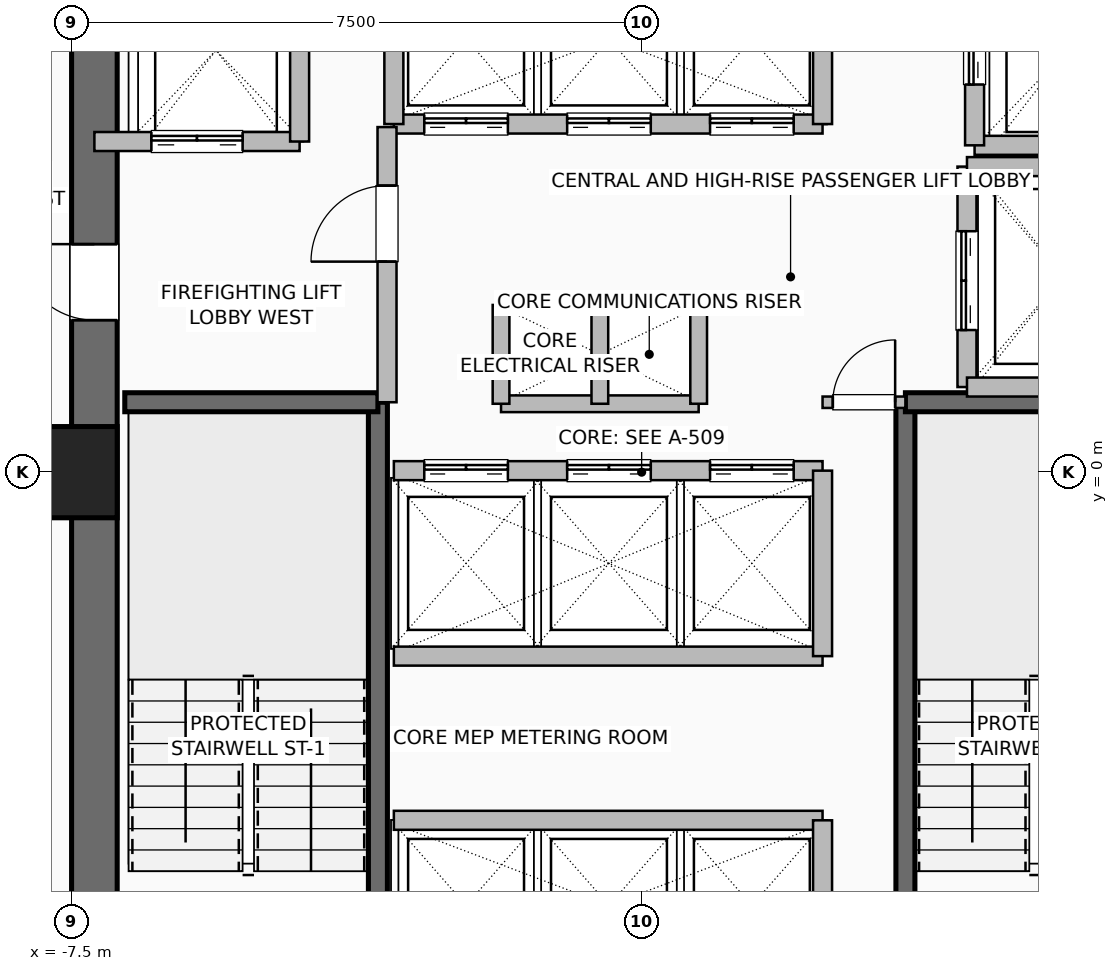
"""IFC4 building model, lengths in metres.
Left out: names, types, materials, properties, quantities, classifications, styles, units other than length and angle.
Written with IfcOpenShell. Run it as: python <this file> out.ifc"""

import sys

from ifc_helpers import new_model, si_unit, direction, frame, frame_2d, origin, origin_2d, place, context, subcontext, project, spatial, rectangle, hollow_rectangle, extrude, element, fill, save


model = new_model("IFC4")
c1 = context("Model", 3, precision=1e-05, world=origin(), true_north=direction((0.0, 1.0)))
c2 = subcontext(c1, "Body", "Model", "MODEL_VIEW")
j1 = project(units=[si_unit("LENGTHUNIT", "METRE"), si_unit("PLANEANGLEUNIT", "RADIAN")], contexts=[c1])
p1 = place(None, origin())
s1 = spatial("IfcSite", under=j1, at=p1, CompositionType="ELEMENT")
p2 = place(p1, origin())
s2 = spatial("IfcBuilding", under=s1, at=p2, CompositionType="ELEMENT")
p3 = place(p2, frame((0.0, 0.0, 30.5)))
s3 = spatial("IfcBuildingStorey", under=s2, at=p3, CompositionType="ELEMENT", Elevation=30.5)
p4 = place(p3, frame((-7.5, 0.0, 0.0), z_axis=(0.0, 0.0, 1.0), x_axis=(1.0, 0.0, 0.0)))
e1 = element("IfcColumn", 1, at=p4, inside=s3, PredefinedType="COLUMN", context=c2, shape_type="SweptSolid", body=[
    extrude(hollow_rectangle(XDim=1.2, YDim=1.2, WallThickness=0.055, at=origin_2d()), origin(), (0.0, 0.0, 1.0), 3.5),
])
p5 = place(p3, frame((-7.2, -7.5, 0.0), z_axis=(0.0, 0.0, 1.0), x_axis=(0.0, 1.0, 0.0)))
e2 = element("IfcWall", 2, at=p5, inside=s3, PredefinedType="SHEAR", context=c2, shape_type="SweptSolid", body=[
    extrude(rectangle(XDim=15.0, YDim=0.6, at=frame_2d((7.5, 0.0))), origin(), (0.0, 0.0, 1.0), 3.25),
])
p6 = place(p5, frame((9.5, 0.0, 0.0)))
e3 = element("IfcOpeningElement", 3, at=p6, cuts=e2, PredefinedType="OPENING", context=c2, shape_type="SweptSolid", body=[
    extrude(rectangle(XDim=1.0, YDim=2.08, at=frame_2d((0.5, 1.04))), frame((0.0, 0.31, 0.0), z_axis=(0.0, -1.0, 0.0), x_axis=(1.0, 0.0, 0.0)), (0.0, 0.0, 1.0), 0.62),
])
p7 = place(p3, frame((-3.47, -6.8, 0.0), z_axis=(0.0, 0.0, 1.0), x_axis=(0.0, 1.0, 0.0)))
e4 = element("IfcWall", 4, at=p7, inside=s3, PredefinedType="SHEAR", context=c2, shape_type="SweptSolid", body=[
    extrude(rectangle(XDim=7.72, YDim=0.25, at=frame_2d((3.86, 0.0))), origin(), (0.0, 0.0, 1.0), 3.25),
])
p8 = place(p3, frame((-6.8, 0.92, 0.0), z_axis=(0.0, 0.0, 1.0), x_axis=(1.0, 0.0, 0.0)))
e5 = element("IfcWall", 5, at=p8, inside=s3, PredefinedType="SHEAR", context=c2, shape_type="SweptSolid", body=[
    extrude(rectangle(XDim=3.33, YDim=0.25, at=frame_2d((1.665, 0.0))), origin(), (0.0, 0.0, 1.0), 3.25),
])
p9 = place(p3, frame((3.47, -6.8, 0.0), z_axis=(0.0, 0.0, 1.0), x_axis=(0.0, 1.0, 0.0)))
e6 = element("IfcWall", 6, at=p9, inside=s3, PredefinedType="SHEAR", context=c2, shape_type="SweptSolid", body=[
    extrude(rectangle(XDim=7.72, YDim=0.25, at=frame_2d((3.86, 0.0))), origin(), (0.0, 0.0, 1.0), 3.25),
])
p10 = place(p3, frame((3.47, 0.92, 0.0), z_axis=(0.0, 0.0, 1.0), x_axis=(1.0, 0.0, 0.0)))
e7 = element("IfcWall", 7, at=p10, inside=s3, PredefinedType="SHEAR", context=c2, shape_type="SweptSolid", body=[
    extrude(rectangle(XDim=3.33, YDim=0.25, at=frame_2d((1.665, 0.0))), origin(), (0.0, 0.0, 1.0), 3.25),
])
for number, where, z_axis, x_axis in (
    (8, (-1.85, 2.2, 0.0), (0.0, 0.0, 1.0), (1.0, 0.0, 0.0)),
    (9, (-1.85, 0.9, 0.0), (0.0, 0.0, 1.0), (1.0, 0.0, 0.0)),
):
    element("IfcWall", number, at=place(p3, frame(where, z_axis=z_axis, x_axis=x_axis)), inside=s3, PredefinedType="PARTITIONING", context=c2, shape_type="SweptSolid", body=[
        extrude(rectangle(XDim=2.6, YDim=0.22, at=frame_2d((1.3, 0.0))), origin(), (0.0, 0.0, 1.0), 3.25),
    ])
for number, where, z_axis, x_axis in (
    (10, (-0.55, 0.9, 0.0), (0.0, 0.0, 1.0), (0.0, 1.0, 0.0)),
    (11, (0.75, 0.9, 0.0), (0.0, 0.0, 1.0), (0.0, 1.0, 0.0)),
    (12, (-1.85, 0.9, 0.0), (0.0, 0.0, 1.0), (0.0, 1.0, 0.0)),
):
    element("IfcWall", number, at=place(p3, frame(where, z_axis=z_axis, x_axis=x_axis)), inside=s3, PredefinedType="PARTITIONING", context=c2, shape_type="SweptSolid", body=[
        extrude(rectangle(XDim=1.3, YDim=0.22, at=frame_2d((0.65, 0.0))), origin(), (0.0, 0.0, 1.0), 3.25),
    ])
p11 = place(p3, frame((-3.26, -4.58, 0.0), z_axis=(0.0, 0.0, 1.0), x_axis=(1.0, 0.0, 0.0)))
e13 = element("IfcWall", 13, at=p11, inside=s3, PredefinedType="SHEAR", context=c2, shape_type="SweptSolid", body=[
    extrude(rectangle(XDim=5.64, YDim=0.25, at=frame_2d((2.82, 0.0))), origin(), (0.0, 0.0, 1.0), 3.25),
])
p12 = place(p3, frame((2.38, -6.8, 0.0), z_axis=(0.0, 0.0, 1.0), x_axis=(0.0, 1.0, 0.0)))
e14 = element("IfcWall", 14, at=p12, inside=s3, PredefinedType="SHEAR", context=c2, shape_type="SweptSolid", body=[
    extrude(rectangle(XDim=2.22, YDim=0.25, at=frame_2d((1.11, 0.0))), origin(), (0.0, 0.0, 1.0), 3.25),
])
p13 = place(p3, frame((-3.26, 0.02, 0.0), z_axis=(0.0, 0.0, 1.0), x_axis=(1.0, 0.0, 0.0)))
e15 = element("IfcWall", 15, at=p13, inside=s3, PredefinedType="SHEAR", context=c2, shape_type="SweptSolid", body=[
    extrude(rectangle(XDim=5.64, YDim=0.25, at=frame_2d((2.82, 0.0))), origin(), (0.0, 0.0, 1.0), 3.25),
])
p14 = place(p13, frame((0.4, 0.0, 0.0)))
e16 = element("IfcOpeningElement", 16, at=p14, cuts=e15, PredefinedType="OPENING", context=c2, shape_type="SweptSolid", body=[
    extrude(rectangle(XDim=1.1, YDim=2.2, at=frame_2d((0.55, 1.1))), frame((0.0, 0.135, 0.0), z_axis=(0.0, -1.0, 0.0), x_axis=(1.0, 0.0, 0.0)), (0.0, 0.0, 1.0), 0.27),
])
p15 = place(p13, frame((2.28, 0.0, 0.0)))
e17 = element("IfcOpeningElement", 17, at=p15, cuts=e15, PredefinedType="OPENING", context=c2, shape_type="SweptSolid", body=[
    extrude(rectangle(XDim=1.1, YDim=2.2, at=frame_2d((0.55, 1.1))), frame((0.0, 0.135, 0.0), z_axis=(0.0, -1.0, 0.0), x_axis=(1.0, 0.0, 0.0)), (0.0, 0.0, 1.0), 0.27),
])
p16 = place(p13, frame((4.16, 0.0, 0.0)))
e18 = element("IfcOpeningElement", 18, at=p16, cuts=e15, PredefinedType="OPENING", context=c2, shape_type="SweptSolid", body=[
    extrude(rectangle(XDim=1.1, YDim=2.2, at=frame_2d((0.55, 1.1))), frame((0.0, 0.135, 0.0), z_axis=(0.0, -1.0, 0.0), x_axis=(1.0, 0.0, 0.0)), (0.0, 0.0, 1.0), 0.27),
])
p17 = place(p3, frame((-3.26, -2.42, 0.0), z_axis=(0.0, 0.0, 1.0), x_axis=(1.0, 0.0, 0.0)))
e19 = element("IfcWall", 19, at=p17, inside=s3, PredefinedType="SHEAR", context=c2, shape_type="SweptSolid", body=[
    extrude(rectangle(XDim=5.64, YDim=0.25, at=frame_2d((2.82, 0.0))), origin(), (0.0, 0.0, 1.0), 3.25),
])
p18 = place(p3, frame((2.38, -2.42, 0.0), z_axis=(0.0, 0.0, 1.0), x_axis=(0.0, 1.0, 0.0)))
e20 = element("IfcWall", 20, at=p18, inside=s3, PredefinedType="SHEAR", context=c2, shape_type="SweptSolid", body=[
    extrude(rectangle(XDim=2.44, YDim=0.25, at=frame_2d((1.22, 0.0))), origin(), (0.0, 0.0, 1.0), 3.25),
])
p19 = place(p3, frame((-3.26, 4.58, 0.0), z_axis=(0.0, 0.0, 1.0), x_axis=(1.0, 0.0, 0.0)))
e21 = element("IfcWall", 21, at=p19, inside=s3, PredefinedType="SHEAR", context=c2, shape_type="SweptSolid", body=[
    extrude(rectangle(XDim=5.64, YDim=0.25, at=frame_2d((2.82, 0.0))), origin(), (0.0, 0.0, 1.0), 3.25),
])
p20 = place(p19, frame((0.4, 0.0, 0.0)))
e22 = element("IfcOpeningElement", 22, at=p20, cuts=e21, PredefinedType="OPENING", context=c2, shape_type="SweptSolid", body=[
    extrude(rectangle(XDim=1.1, YDim=2.2, at=frame_2d((0.55, 1.1))), frame((0.0, 0.135, 0.0), z_axis=(0.0, -1.0, 0.0), x_axis=(1.0, 0.0, 0.0)), (0.0, 0.0, 1.0), 0.27),
])
p21 = place(p19, frame((2.28, 0.0, 0.0)))
e23 = element("IfcOpeningElement", 23, at=p21, cuts=e21, PredefinedType="OPENING", context=c2, shape_type="SweptSolid", body=[
    extrude(rectangle(XDim=1.1, YDim=2.2, at=frame_2d((0.55, 1.1))), frame((0.0, 0.135, 0.0), z_axis=(0.0, -1.0, 0.0), x_axis=(1.0, 0.0, 0.0)), (0.0, 0.0, 1.0), 0.27),
])
p22 = place(p19, frame((4.16, 0.0, 0.0)))
e24 = element("IfcOpeningElement", 24, at=p22, cuts=e21, PredefinedType="OPENING", context=c2, shape_type="SweptSolid", body=[
    extrude(rectangle(XDim=1.1, YDim=2.2, at=frame_2d((0.55, 1.1))), frame((0.0, 0.135, 0.0), z_axis=(0.0, -1.0, 0.0), x_axis=(1.0, 0.0, 0.0)), (0.0, 0.0, 1.0), 0.27),
])
for number, where, z_axis, x_axis in (
    (25, (-3.26, 4.58, 0.0), (0.0, 0.0, 1.0), (0.0, 1.0, 0.0)),
    (26, (2.38, 4.58, 0.0), (0.0, 0.0, 1.0), (0.0, 1.0, 0.0)),
):
    element("IfcWall", number, at=place(p3, frame(where, z_axis=z_axis, x_axis=x_axis)), inside=s3, PredefinedType="SHEAR", context=c2, shape_type="SweptSolid", body=[
        extrude(rectangle(XDim=2.22, YDim=0.25, at=frame_2d((1.11, 0.0))), origin(), (0.0, 0.0, 1.0), 3.25),
    ])
p23 = place(p3, frame((-7.2, 4.35, 0.0), z_axis=(0.0, 0.0, 1.0), x_axis=(1.0, 0.0, 0.0)))
e27 = element("IfcWall", 27, at=p23, inside=s3, PredefinedType="SHEAR", context=c2, shape_type="SweptSolid", body=[
    extrude(rectangle(XDim=2.7, YDim=0.25, at=frame_2d((1.35, 0.0))), origin(), (0.0, 0.0, 1.0), 3.25),
])
p24 = place(p23, frame((0.75, 0.0, 0.0)))
e28 = element("IfcOpeningElement", 28, at=p24, cuts=e27, PredefinedType="OPENING", context=c2, shape_type="SweptSolid", body=[
    extrude(rectangle(XDim=1.2, YDim=2.2, at=frame_2d((0.6, 1.1))), frame((0.0, 0.135, 0.0), z_axis=(0.0, -1.0, 0.0), x_axis=(1.0, 0.0, 0.0)), (0.0, 0.0, 1.0), 0.27),
])
p25 = place(p3, frame((-4.5, 4.35, 0.0), z_axis=(0.0, 0.0, 1.0), x_axis=(0.0, 1.0, 0.0)))
e29 = element("IfcWall", 29, at=p25, inside=s3, PredefinedType="SHEAR", context=c2, shape_type="SweptSolid", body=[
    extrude(rectangle(XDim=2.85, YDim=0.25, at=frame_2d((1.425, 0.0))), origin(), (0.0, 0.0, 1.0), 3.25),
])
p26 = place(p3, frame((4.38, 4.3, 0.0), z_axis=(0.0, 0.0, 1.0), x_axis=(1.0, 0.0, 0.0)))
e30 = element("IfcWall", 30, at=p26, inside=s3, PredefinedType="SHEAR", context=c2, shape_type="SweptSolid", body=[
    extrude(rectangle(XDim=2.42, YDim=0.25, at=frame_2d((1.21, 0.0))), origin(), (0.0, 0.0, 1.0), 3.25),
])
p27 = place(p3, frame((4.38, 4.3, 0.0), z_axis=(0.0, 0.0, 1.0), x_axis=(0.0, 1.0, 0.0)))
e31 = element("IfcWall", 31, at=p27, inside=s3, PredefinedType="SHEAR", context=c2, shape_type="SweptSolid", body=[
    extrude(rectangle(XDim=2.5, YDim=0.25, at=frame_2d((1.25, 0.0))), origin(), (0.0, 0.0, 1.0), 3.25),
])
p28 = place(p27, frame((0.8, 0.0, 0.0)))
e32 = element("IfcOpeningElement", 32, at=p28, cuts=e31, PredefinedType="OPENING", context=c2, shape_type="SweptSolid", body=[
    extrude(rectangle(XDim=1.2, YDim=2.2, at=frame_2d((0.6, 1.1))), frame((0.0, 0.135, 0.0), z_axis=(0.0, -1.0, 0.0), x_axis=(1.0, 0.0, 0.0)), (0.0, 0.0, 1.0), 0.27),
])
p29 = place(p3, frame((4.28, 1.12, 0.0), z_axis=(0.0, 0.0, 1.0), x_axis=(0.0, 1.0, 0.0)))
e33 = element("IfcWall", 33, at=p29, inside=s3, PredefinedType="SHEAR", context=c2, shape_type="SweptSolid", body=[
    extrude(rectangle(XDim=2.9, YDim=0.25, at=frame_2d((1.45, 0.0))), origin(), (0.0, 0.0, 1.0), 3.25),
])
p30 = place(p29, frame((0.75, 0.0, 0.0)))
e34 = element("IfcOpeningElement", 34, at=p30, cuts=e33, PredefinedType="OPENING", context=c2, shape_type="SweptSolid", body=[
    extrude(rectangle(XDim=1.3, YDim=2.3, at=frame_2d((0.65, 1.15))), frame((0.0, 0.135, 0.0), z_axis=(0.0, -1.0, 0.0), x_axis=(1.0, 0.0, 0.0)), (0.0, 0.0, 1.0), 0.27),
])
for number, where, z_axis, x_axis in (
    (35, (4.28, 1.12, 0.0), (0.0, 0.0, 1.0), (1.0, 0.0, 0.0)),
    (36, (4.28, 4.02, 0.0), (0.0, 0.0, 1.0), (1.0, 0.0, 0.0)),
):
    element("IfcWall", number, at=place(p3, frame(where, z_axis=z_axis, x_axis=x_axis)), inside=s3, PredefinedType="SHEAR", context=c2, shape_type="SweptSolid", body=[
        extrude(rectangle(XDim=2.52, YDim=0.25, at=frame_2d((1.26, 0.0))), origin(), (0.0, 0.0, 1.0), 3.25),
    ])
p31 = place(p3, frame((-3.35, 0.92, 0.0), z_axis=(0.0, 0.0, 1.0), x_axis=(0.0, 1.0, 0.0)))
e37 = element("IfcWall", 37, at=p31, inside=s3, PredefinedType="SHEAR", context=c2, shape_type="SweptSolid", body=[
    extrude(rectangle(XDim=3.62, YDim=0.25, at=frame_2d((1.81, 0.0))), origin(), (0.0, 0.0, 1.0), 3.25),
])
p32 = place(p31, frame((1.85, 0.0, 0.0)))
e38 = element("IfcOpeningElement", 38, at=p32, cuts=e37, PredefinedType="OPENING", context=c2, shape_type="SweptSolid", body=[
    extrude(rectangle(XDim=1.0, YDim=2.08, at=frame_2d((0.5, 1.04))), frame((0.0, 0.135, 0.0), z_axis=(0.0, -1.0, 0.0), x_axis=(1.0, 0.0, 0.0)), (0.0, 0.0, 1.0), 0.27),
])
p33 = place(p3, frame((2.38, 0.92, 0.0), z_axis=(0.0, 0.0, 1.0), x_axis=(1.0, 0.0, 0.0)))
e39 = element("IfcWall", 39, at=p33, inside=s3, PredefinedType="PARTITIONING", context=c2, shape_type="SweptSolid", body=[
    extrude(rectangle(XDim=1.09, YDim=0.15, at=frame_2d((0.545, 0.0))), origin(), (0.0, 0.0, 1.0), 3.25),
])
p34 = place(p33, frame((0.135, 0.0, 0.0)))
e40 = element("IfcOpeningElement", 40, at=p34, cuts=e39, PredefinedType="OPENING", context=c2, shape_type="SweptSolid", body=[
    extrude(rectangle(XDim=0.82, YDim=2.05, at=frame_2d((0.41, 1.025))), frame((0.0, 0.085, 0.0), z_axis=(0.0, -1.0, 0.0), x_axis=(1.0, 0.0, 0.0)), (0.0, 0.0, 1.0), 0.17),
])
p35 = place(p6, origin())
e41 = element("IfcDoor", 41, at=p35, inside=s3, OperationType="SINGLE_SWING_RIGHT", PredefinedType="DOOR", context=c2, shape_type="SweptSolid", body=[
    extrude(rectangle(XDim=1.0, YDim=2.08, at=frame_2d((0.5, 1.04))), frame((0.0, 0.025, 0.0), z_axis=(0.0, -1.0, 0.0), x_axis=(1.0, 0.0, 0.0)), (0.0, 0.0, 1.0), 0.05),
])
fill(e3, e41)
p36 = place(p14, origin())
e42 = element("IfcDoor", 42, at=p36, inside=s3, OperationType="DOUBLE_DOOR_SLIDING", PredefinedType="DOOR", context=c2, shape_type="SweptSolid", body=[
    extrude(rectangle(XDim=1.1, YDim=2.2, at=frame_2d((0.55, 1.1))), frame((0.0, 0.025, 0.0), z_axis=(0.0, -1.0, 0.0), x_axis=(1.0, 0.0, 0.0)), (0.0, 0.0, 1.0), 0.05),
])
fill(e16, e42)
p37 = place(p15, origin())
e43 = element("IfcDoor", 43, at=p37, inside=s3, OperationType="DOUBLE_DOOR_SLIDING", PredefinedType="DOOR", context=c2, shape_type="SweptSolid", body=[
    extrude(rectangle(XDim=1.1, YDim=2.2, at=frame_2d((0.55, 1.1))), frame((0.0, 0.025, 0.0), z_axis=(0.0, -1.0, 0.0), x_axis=(1.0, 0.0, 0.0)), (0.0, 0.0, 1.0), 0.05),
])
fill(e17, e43)
p38 = place(p16, origin())
e44 = element("IfcDoor", 44, at=p38, inside=s3, OperationType="DOUBLE_DOOR_SLIDING", PredefinedType="DOOR", context=c2, shape_type="SweptSolid", body=[
    extrude(rectangle(XDim=1.1, YDim=2.2, at=frame_2d((0.55, 1.1))), frame((0.0, 0.025, 0.0), z_axis=(0.0, -1.0, 0.0), x_axis=(1.0, 0.0, 0.0)), (0.0, 0.0, 1.0), 0.05),
])
fill(e18, e44)
p39 = place(p20, origin())
e45 = element("IfcDoor", 45, at=p39, inside=s3, OperationType="DOUBLE_DOOR_SLIDING", PredefinedType="DOOR", context=c2, shape_type="SweptSolid", body=[
    extrude(rectangle(XDim=1.1, YDim=2.2, at=frame_2d((0.55, 1.1))), frame((0.0, 0.025, 0.0), z_axis=(0.0, -1.0, 0.0), x_axis=(1.0, 0.0, 0.0)), (0.0, 0.0, 1.0), 0.05),
])
fill(e22, e45)
p40 = place(p21, origin())
e46 = element("IfcDoor", 46, at=p40, inside=s3, OperationType="DOUBLE_DOOR_SLIDING", PredefinedType="DOOR", context=c2, shape_type="SweptSolid", body=[
    extrude(rectangle(XDim=1.1, YDim=2.2, at=frame_2d((0.55, 1.1))), frame((0.0, 0.025, 0.0), z_axis=(0.0, -1.0, 0.0), x_axis=(1.0, 0.0, 0.0)), (0.0, 0.0, 1.0), 0.05),
])
fill(e23, e46)
p41 = place(p22, origin())
e47 = element("IfcDoor", 47, at=p41, inside=s3, OperationType="DOUBLE_DOOR_SLIDING", PredefinedType="DOOR", context=c2, shape_type="SweptSolid", body=[
    extrude(rectangle(XDim=1.1, YDim=2.2, at=frame_2d((0.55, 1.1))), frame((0.0, 0.025, 0.0), z_axis=(0.0, -1.0, 0.0), x_axis=(1.0, 0.0, 0.0)), (0.0, 0.0, 1.0), 0.05),
])
fill(e24, e47)
p42 = place(p24, origin())
e48 = element("IfcDoor", 48, at=p42, inside=s3, OperationType="DOUBLE_DOOR_SLIDING", PredefinedType="DOOR", context=c2, shape_type="SweptSolid", body=[
    extrude(rectangle(XDim=1.2, YDim=2.2, at=frame_2d((0.6, 1.1))), frame((0.0, 0.025, 0.0), z_axis=(0.0, -1.0, 0.0), x_axis=(1.0, 0.0, 0.0)), (0.0, 0.0, 1.0), 0.05),
])
fill(e28, e48)
p43 = place(p28, origin())
e49 = element("IfcDoor", 49, at=p43, inside=s3, OperationType="DOUBLE_DOOR_SLIDING", PredefinedType="DOOR", context=c2, shape_type="SweptSolid", body=[
    extrude(rectangle(XDim=1.2, YDim=2.2, at=frame_2d((0.6, 1.1))), frame((0.0, 0.025, 0.0), z_axis=(0.0, -1.0, 0.0), x_axis=(1.0, 0.0, 0.0)), (0.0, 0.0, 1.0), 0.05),
])
fill(e32, e49)
p44 = place(p30, origin())
e50 = element("IfcDoor", 50, at=p44, inside=s3, OperationType="DOUBLE_DOOR_SLIDING", PredefinedType="DOOR", context=c2, shape_type="SweptSolid", body=[
    extrude(rectangle(XDim=1.3, YDim=2.3, at=frame_2d((0.65, 1.15))), frame((0.0, 0.025, 0.0), z_axis=(0.0, -1.0, 0.0), x_axis=(1.0, 0.0, 0.0)), (0.0, 0.0, 1.0), 0.05),
])
fill(e34, e50)
p45 = place(p32, origin())
e51 = element("IfcDoor", 51, at=p45, inside=s3, OperationType="SINGLE_SWING_LEFT", PredefinedType="DOOR", context=c2, shape_type="SweptSolid", body=[
    extrude(rectangle(XDim=1.0, YDim=2.08, at=frame_2d((0.5, 1.04))), frame((0.0, 0.025, 0.0), z_axis=(0.0, -1.0, 0.0), x_axis=(1.0, 0.0, 0.0)), (0.0, 0.0, 1.0), 0.05),
])
fill(e38, e51)
p46 = place(p34, origin())
e52 = element("IfcDoor", 52, at=p46, inside=s3, OperationType="SINGLE_SWING_RIGHT", PredefinedType="DOOR", context=c2, shape_type="SweptSolid", body=[
    extrude(rectangle(XDim=0.82, YDim=2.05, at=frame_2d((0.41, 1.025))), frame((0.0, 0.025, 0.0), z_axis=(0.0, -1.0, 0.0), x_axis=(1.0, 0.0, 0.0)), (0.0, 0.0, 1.0), 0.05),
])
fill(e40, e52)
save(model, sys.argv[1])
